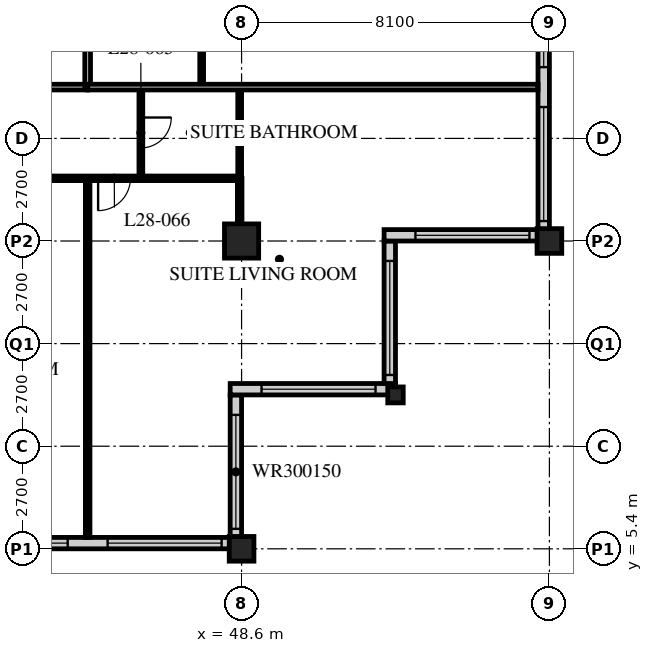
"""IFC4 building model, lengths in metres.
Left out: names, types, materials, properties, quantities, classifications, styles, units other than length and angle.
Written with IfcOpenShell. Run it as: python <this file> out.ifc"""

import sys

from ifc_helpers import new_model, si_unit, direction, frame, frame_2d, origin, origin_2d, place, context, subcontext, project, spatial, rectangle, hollow_rectangle, i_section, extrude, element, fill, save


model = new_model("IFC4")
c1 = context("Model", 3, precision=1e-05, world=origin(), true_north=direction((0.0, 1.0)))
c2 = subcontext(c1, "Body", "Model", "MODEL_VIEW")
j1 = project(units=[si_unit("LENGTHUNIT", "METRE"), si_unit("PLANEANGLEUNIT", "RADIAN")], contexts=[c1])
p1 = place(None, origin())
s1 = spatial("IfcSite", under=j1, at=p1, CompositionType="ELEMENT")
p2 = place(p1, origin())
s2 = spatial("IfcBuilding", under=s1, at=p2, CompositionType="ELEMENT")
p3 = place(p2, frame((0.0, 0.0, 113.6)))
s3 = spatial("IfcBuildingStorey", under=s2, at=p3, CompositionType="ELEMENT", Elevation=113.6)
p4 = place(p3, frame((48.6, 5.4, 0.0), z_axis=(0.0, 0.0, 1.0), x_axis=(1.0, 0.0, 0.0)))
e1 = element("IfcColumn", 1, at=p4, inside=s3, PredefinedType="COLUMN", context=c2, shape_type="SweptSolid", body=[
    extrude(hollow_rectangle(XDim=0.65, YDim=0.65, WallThickness=0.055, at=origin_2d()), origin(), (0.0, 0.0, 1.0), 3.4),
])
p5 = place(p3, frame((48.6, 13.5, 0.0), z_axis=(0.0, 0.0, 1.0), x_axis=(1.0, 0.0, 0.0)))
e2 = element("IfcColumn", 2, at=p5, inside=s3, PredefinedType="COLUMN", context=c2, shape_type="SweptSolid", body=[
    extrude(hollow_rectangle(XDim=0.9, YDim=0.9, WallThickness=0.09, at=origin_2d()), origin(), (0.0, 0.0, 1.0), 3.4),
])
p6 = place(p3, frame((52.65, 9.45, 0.0), z_axis=(0.0, 0.0, 1.0), x_axis=(1.0, 0.0, 0.0)))
e3 = element("IfcColumn", 3, at=p6, inside=s3, PredefinedType="COLUMN", context=c2, shape_type="SweptSolid", body=[
    extrude(i_section(OverallWidth=0.407, OverallDepth=0.419, WebThickness=0.031, FlangeThickness=0.049, FilletRadius=0.015, at=origin_2d()), origin(), (0.0, 0.0, 1.0), 3.4),
])
p7 = place(p3, frame((56.7, 13.5, 0.0), z_axis=(0.0, 0.0, 1.0), x_axis=(1.0, 0.0, 0.0)))
e4 = element("IfcColumn", 4, at=p7, inside=s3, PredefinedType="COLUMN", context=c2, shape_type="SweptSolid", body=[
    extrude(hollow_rectangle(XDim=0.65, YDim=0.65, WallThickness=0.055, at=origin_2d()), origin(), (0.0, 0.0, 1.0), 3.4),
])
p8 = place(p3, frame((8.4, 5.55, 0.0), z_axis=(0.0, 0.0, 1.0), x_axis=(1.0, 0.0, 0.0)))
e5 = element("IfcWall", 5, at=p8, inside=s3, PredefinedType="SOLIDWALL", context=c2, shape_type="SweptSolid", body=[
    extrude(rectangle(XDim=40.2, YDim=0.3, at=frame_2d((20.1, 0.0))), origin(), (0.0, 0.0, 1.0), 3.19),
])
p9 = place(p8, frame((0.225, 0.0, 0.9)))
e6 = element("IfcOpeningElement", 6, at=p9, cuts=e5, PredefinedType="OPENING", context=c2, shape_type="SweptSolid", body=[
    extrude(rectangle(XDim=3.0, YDim=2.0, at=frame_2d((1.5, 1.0))), frame((0.0, 0.16, 0.0), z_axis=(0.0, -1.0, 0.0), x_axis=(1.0, 0.0, 0.0)), (0.0, 0.0, 1.0), 0.32),
])
p10 = place(p8, frame((4.275, 0.0, 0.9)))
e7 = element("IfcOpeningElement", 7, at=p10, cuts=e5, PredefinedType="OPENING", context=c2, shape_type="SweptSolid", body=[
    extrude(rectangle(XDim=3.0, YDim=2.0, at=frame_2d((1.5, 1.0))), frame((0.0, 0.16, 0.0), z_axis=(0.0, -1.0, 0.0), x_axis=(1.0, 0.0, 0.0)), (0.0, 0.0, 1.0), 0.32),
])
p11 = place(p8, frame((8.325, 0.0, 0.9)))
e8 = element("IfcOpeningElement", 8, at=p11, cuts=e5, PredefinedType="OPENING", context=c2, shape_type="SweptSolid", body=[
    extrude(rectangle(XDim=3.0, YDim=2.0, at=frame_2d((1.5, 1.0))), frame((0.0, 0.16, 0.0), z_axis=(0.0, -1.0, 0.0), x_axis=(1.0, 0.0, 0.0)), (0.0, 0.0, 1.0), 0.32),
])
p12 = place(p8, frame((12.375, 0.0, 0.9)))
e9 = element("IfcOpeningElement", 9, at=p12, cuts=e5, PredefinedType="OPENING", context=c2, shape_type="SweptSolid", body=[
    extrude(rectangle(XDim=3.0, YDim=2.0, at=frame_2d((1.5, 1.0))), frame((0.0, 0.16, 0.0), z_axis=(0.0, -1.0, 0.0), x_axis=(1.0, 0.0, 0.0)), (0.0, 0.0, 1.0), 0.32),
])
p13 = place(p8, frame((16.425, 0.0, 0.9)))
e10 = element("IfcOpeningElement", 10, at=p13, cuts=e5, PredefinedType="OPENING", context=c2, shape_type="SweptSolid", body=[
    extrude(rectangle(XDim=3.0, YDim=2.0, at=frame_2d((1.5, 1.0))), frame((0.0, 0.16, 0.0), z_axis=(0.0, -1.0, 0.0), x_axis=(1.0, 0.0, 0.0)), (0.0, 0.0, 1.0), 0.32),
])
p14 = place(p8, frame((20.475, 0.0, 0.9)))
e11 = element("IfcOpeningElement", 11, at=p14, cuts=e5, PredefinedType="OPENING", context=c2, shape_type="SweptSolid", body=[
    extrude(rectangle(XDim=3.0, YDim=2.0, at=frame_2d((1.5, 1.0))), frame((0.0, 0.16, 0.0), z_axis=(0.0, -1.0, 0.0), x_axis=(1.0, 0.0, 0.0)), (0.0, 0.0, 1.0), 0.32),
])
p15 = place(p8, frame((24.525, 0.0, 0.9)))
e12 = element("IfcOpeningElement", 12, at=p15, cuts=e5, PredefinedType="OPENING", context=c2, shape_type="SweptSolid", body=[
    extrude(rectangle(XDim=3.0, YDim=2.0, at=frame_2d((1.5, 1.0))), frame((0.0, 0.16, 0.0), z_axis=(0.0, -1.0, 0.0), x_axis=(1.0, 0.0, 0.0)), (0.0, 0.0, 1.0), 0.32),
])
p16 = place(p8, frame((28.575, 0.0, 0.9)))
e13 = element("IfcOpeningElement", 13, at=p16, cuts=e5, PredefinedType="OPENING", context=c2, shape_type="SweptSolid", body=[
    extrude(rectangle(XDim=3.0, YDim=2.0, at=frame_2d((1.5, 1.0))), frame((0.0, 0.16, 0.0), z_axis=(0.0, -1.0, 0.0), x_axis=(1.0, 0.0, 0.0)), (0.0, 0.0, 1.0), 0.32),
])
p17 = place(p8, frame((32.625, 0.0, 0.9)))
e14 = element("IfcOpeningElement", 14, at=p17, cuts=e5, PredefinedType="OPENING", context=c2, shape_type="SweptSolid", body=[
    extrude(rectangle(XDim=3.0, YDim=2.0, at=frame_2d((1.5, 1.0))), frame((0.0, 0.16, 0.0), z_axis=(0.0, -1.0, 0.0), x_axis=(1.0, 0.0, 0.0)), (0.0, 0.0, 1.0), 0.32),
])
p18 = place(p8, frame((36.675, 0.0, 0.9)))
e15 = element("IfcOpeningElement", 15, at=p18, cuts=e5, PredefinedType="OPENING", context=c2, shape_type="SweptSolid", body=[
    extrude(rectangle(XDim=3.0, YDim=2.0, at=frame_2d((1.5, 1.0))), frame((0.0, 0.16, 0.0), z_axis=(0.0, -1.0, 0.0), x_axis=(1.0, 0.0, 0.0)), (0.0, 0.0, 1.0), 0.32),
])
p19 = place(p3, frame((48.45, 5.7, 0.0), z_axis=(0.0, 0.0, 1.0), x_axis=(0.0, 1.0, 0.0)))
e16 = element("IfcWall", 16, at=p19, inside=s3, PredefinedType="SOLIDWALL", context=c2, shape_type="SweptSolid", body=[
    extrude(rectangle(XDim=3.75, YDim=0.3, at=frame_2d((1.875, 0.0))), origin(), (0.0, 0.0, 1.0), 3.19),
])
p20 = place(p19, frame((0.225, 0.0, 0.9)))
e17 = element("IfcOpeningElement", 17, at=p20, cuts=e16, PredefinedType="OPENING", context=c2, shape_type="SweptSolid", body=[
    extrude(rectangle(XDim=3.0, YDim=1.5, at=frame_2d((1.5, 0.75))), frame((0.0, 0.16, 0.0), z_axis=(0.0, -1.0, 0.0), x_axis=(1.0, 0.0, 0.0)), (0.0, 0.0, 1.0), 0.32),
])
p21 = place(p3, frame((48.3, 9.6, 0.0), z_axis=(0.0, 0.0, 1.0), x_axis=(1.0, 0.0, 0.0)))
e18 = element("IfcWall", 18, at=p21, inside=s3, PredefinedType="SOLIDWALL", context=c2, shape_type="SweptSolid", body=[
    extrude(rectangle(XDim=4.35, YDim=0.3, at=frame_2d((2.175, 0.0))), origin(), (0.0, 0.0, 1.0), 3.19),
])
p22 = place(p21, frame((0.825, 0.0, 0.9)))
e19 = element("IfcOpeningElement", 19, at=p22, cuts=e18, PredefinedType="OPENING", context=c2, shape_type="SweptSolid", body=[
    extrude(rectangle(XDim=3.0, YDim=1.5, at=frame_2d((1.5, 0.75))), frame((0.0, 0.16, 0.0), z_axis=(0.0, -1.0, 0.0), x_axis=(1.0, 0.0, 0.0)), (0.0, 0.0, 1.0), 0.32),
])
p23 = place(p3, frame((52.5, 9.75, 0.0), z_axis=(0.0, 0.0, 1.0), x_axis=(0.0, 1.0, 0.0)))
e20 = element("IfcWall", 20, at=p23, inside=s3, PredefinedType="SOLIDWALL", context=c2, shape_type="SweptSolid", body=[
    extrude(rectangle(XDim=3.75, YDim=0.3, at=frame_2d((1.875, 0.0))), origin(), (0.0, 0.0, 1.0), 3.19),
])
p24 = place(p23, frame((0.225, 0.0, 0.9)))
e21 = element("IfcOpeningElement", 21, at=p24, cuts=e20, PredefinedType="OPENING", context=c2, shape_type="SweptSolid", body=[
    extrude(rectangle(XDim=3.0, YDim=1.5, at=frame_2d((1.5, 0.75))), frame((0.0, 0.16, 0.0), z_axis=(0.0, -1.0, 0.0), x_axis=(1.0, 0.0, 0.0)), (0.0, 0.0, 1.0), 0.32),
])
p25 = place(p3, frame((52.35, 13.65, 0.0), z_axis=(0.0, 0.0, 1.0), x_axis=(1.0, 0.0, 0.0)))
e22 = element("IfcWall", 22, at=p25, inside=s3, PredefinedType="SOLIDWALL", context=c2, shape_type="SweptSolid", body=[
    extrude(rectangle(XDim=4.35, YDim=0.3, at=frame_2d((2.175, 0.0))), origin(), (0.0, 0.0, 1.0), 3.19),
])
p26 = place(p25, frame((0.825, 0.0, 0.9)))
e23 = element("IfcOpeningElement", 23, at=p26, cuts=e22, PredefinedType="OPENING", context=c2, shape_type="SweptSolid", body=[
    extrude(rectangle(XDim=3.0, YDim=1.5, at=frame_2d((1.5, 0.75))), frame((0.0, 0.16, 0.0), z_axis=(0.0, -1.0, 0.0), x_axis=(1.0, 0.0, 0.0)), (0.0, 0.0, 1.0), 0.32),
])
p27 = place(p3, frame((56.55, 13.8, 0.0), z_axis=(0.0, 0.0, 1.0), x_axis=(0.0, 1.0, 0.0)))
e24 = element("IfcWall", 24, at=p27, inside=s3, PredefinedType="SOLIDWALL", context=c2, shape_type="SweptSolid", body=[
    extrude(rectangle(XDim=32.1, YDim=0.3, at=frame_2d((16.05, 0.0))), origin(), (0.0, 0.0, 1.0), 3.19),
])
p28 = place(p27, frame((0.225, 0.0, 0.9)))
e25 = element("IfcOpeningElement", 25, at=p28, cuts=e24, PredefinedType="OPENING", context=c2, shape_type="SweptSolid", body=[
    extrude(rectangle(XDim=3.0, YDim=2.0, at=frame_2d((1.5, 1.0))), frame((0.0, 0.16, 0.0), z_axis=(0.0, -1.0, 0.0), x_axis=(1.0, 0.0, 0.0)), (0.0, 0.0, 1.0), 0.32),
])
p29 = place(p27, frame((4.275, 0.0, 0.9)))
e26 = element("IfcOpeningElement", 26, at=p29, cuts=e24, PredefinedType="OPENING", context=c2, shape_type="SweptSolid", body=[
    extrude(rectangle(XDim=3.0, YDim=2.0, at=frame_2d((1.5, 1.0))), frame((0.0, 0.16, 0.0), z_axis=(0.0, -1.0, 0.0), x_axis=(1.0, 0.0, 0.0)), (0.0, 0.0, 1.0), 0.32),
])
p30 = place(p27, frame((8.325, 0.0, 0.9)))
e27 = element("IfcOpeningElement", 27, at=p30, cuts=e24, PredefinedType="OPENING", context=c2, shape_type="SweptSolid", body=[
    extrude(rectangle(XDim=3.0, YDim=2.0, at=frame_2d((1.5, 1.0))), frame((0.0, 0.16, 0.0), z_axis=(0.0, -1.0, 0.0), x_axis=(1.0, 0.0, 0.0)), (0.0, 0.0, 1.0), 0.32),
])
p31 = place(p27, frame((12.375, 0.0, 0.9)))
e28 = element("IfcOpeningElement", 28, at=p31, cuts=e24, PredefinedType="OPENING", context=c2, shape_type="SweptSolid", body=[
    extrude(rectangle(XDim=3.0, YDim=2.0, at=frame_2d((1.5, 1.0))), frame((0.0, 0.16, 0.0), z_axis=(0.0, -1.0, 0.0), x_axis=(1.0, 0.0, 0.0)), (0.0, 0.0, 1.0), 0.32),
])
p32 = place(p27, frame((16.425, 0.0, 0.9)))
e29 = element("IfcOpeningElement", 29, at=p32, cuts=e24, PredefinedType="OPENING", context=c2, shape_type="SweptSolid", body=[
    extrude(rectangle(XDim=3.0, YDim=2.0, at=frame_2d((1.5, 1.0))), frame((0.0, 0.16, 0.0), z_axis=(0.0, -1.0, 0.0), x_axis=(1.0, 0.0, 0.0)), (0.0, 0.0, 1.0), 0.32),
])
p33 = place(p27, frame((20.475, 0.0, 0.9)))
e30 = element("IfcOpeningElement", 30, at=p33, cuts=e24, PredefinedType="OPENING", context=c2, shape_type="SweptSolid", body=[
    extrude(rectangle(XDim=3.0, YDim=2.0, at=frame_2d((1.5, 1.0))), frame((0.0, 0.16, 0.0), z_axis=(0.0, -1.0, 0.0), x_axis=(1.0, 0.0, 0.0)), (0.0, 0.0, 1.0), 0.32),
])
p34 = place(p27, frame((24.525, 0.0, 0.9)))
e31 = element("IfcOpeningElement", 31, at=p34, cuts=e24, PredefinedType="OPENING", context=c2, shape_type="SweptSolid", body=[
    extrude(rectangle(XDim=3.0, YDim=2.0, at=frame_2d((1.5, 1.0))), frame((0.0, 0.16, 0.0), z_axis=(0.0, -1.0, 0.0), x_axis=(1.0, 0.0, 0.0)), (0.0, 0.0, 1.0), 0.32),
])
p35 = place(p27, frame((28.575, 0.0, 0.9)))
e32 = element("IfcOpeningElement", 32, at=p35, cuts=e24, PredefinedType="OPENING", context=c2, shape_type="SweptSolid", body=[
    extrude(rectangle(XDim=3.0, YDim=2.0, at=frame_2d((1.5, 1.0))), frame((0.0, 0.16, 0.0), z_axis=(0.0, -1.0, 0.0), x_axis=(1.0, 0.0, 0.0)), (0.0, 0.0, 1.0), 0.32),
])
p36 = place(p3, frame((12.15, 17.55, 0.0), z_axis=(0.0, 0.0, 1.0), x_axis=(1.0, 0.0, 0.0)))
e33 = element("IfcWall", 33, at=p36, inside=s3, PredefinedType="PARTITIONING", context=c2, shape_type="SweptSolid", body=[
    extrude(rectangle(XDim=32.4, YDim=0.15, at=frame_2d((16.2, 0.0))), origin(), (0.0, 0.0, 1.0), 3.19),
])
p37 = place(p36, frame((5.95, 0.0, 0.0)))
e34 = element("IfcOpeningElement", 34, at=p37, cuts=e33, PredefinedType="OPENING", context=c2, shape_type="SweptSolid", body=[
    extrude(rectangle(XDim=1.0, YDim=2.1, at=frame_2d((0.5, 1.05))), frame((0.0, 0.085, 0.0), z_axis=(0.0, -1.0, 0.0), x_axis=(1.0, 0.0, 0.0)), (0.0, 0.0, 1.0), 0.17),
])
p38 = place(p36, frame((17.725, 0.0, 0.0)))
e35 = element("IfcOpeningElement", 35, at=p38, cuts=e33, PredefinedType="OPENING", context=c2, shape_type="SweptSolid", body=[
    extrude(rectangle(XDim=1.0, YDim=2.1, at=frame_2d((0.5, 1.05))), frame((0.0, 0.085, 0.0), z_axis=(0.0, -1.0, 0.0), x_axis=(1.0, 0.0, 0.0)), (0.0, 0.0, 1.0), 0.17),
])
p39 = place(p36, frame((26.75, 0.0, 0.0)))
e36 = element("IfcOpeningElement", 36, at=p39, cuts=e33, PredefinedType="OPENING", context=c2, shape_type="SweptSolid", body=[
    extrude(rectangle(XDim=1.0, YDim=2.1, at=frame_2d((0.5, 1.05))), frame((0.0, 0.085, 0.0), z_axis=(0.0, -1.0, 0.0), x_axis=(1.0, 0.0, 0.0)), (0.0, 0.0, 1.0), 0.17),
])
p40 = place(p36, frame((1.525, 0.0, 0.0)))
e37 = element("IfcOpeningElement", 37, at=p40, cuts=e33, PredefinedType="OPENING", context=c2, shape_type="SweptSolid", body=[
    extrude(rectangle(XDim=1.0, YDim=2.1, at=frame_2d((0.5, 1.05))), frame((0.0, 0.085, 0.0), z_axis=(0.0, -1.0, 0.0), x_axis=(1.0, 0.0, 0.0)), (0.0, 0.0, 1.0), 0.17),
])
p41 = place(p36, frame((29.875, 0.0, 0.0)))
e38 = element("IfcOpeningElement", 38, at=p41, cuts=e33, PredefinedType="OPENING", context=c2, shape_type="SweptSolid", body=[
    extrude(rectangle(XDim=1.0, YDim=2.1, at=frame_2d((0.5, 1.05))), frame((0.0, 0.085, 0.0), z_axis=(0.0, -1.0, 0.0), x_axis=(1.0, 0.0, 0.0)), (0.0, 0.0, 1.0), 0.17),
])
p42 = place(p3, frame((44.55, 17.55, 0.0), z_axis=(0.0, 0.0, 1.0), x_axis=(0.0, 1.0, 0.0)))
e39 = element("IfcWall", 39, at=p42, inside=s3, PredefinedType="PARTITIONING", context=c2, shape_type="SweptSolid", body=[
    extrude(rectangle(XDim=28.35, YDim=0.15, at=frame_2d((14.175, 0.0))), origin(), (0.0, 0.0, 1.0), 3.19),
])
p43 = place(p42, frame((2.75, 0.0, 0.0)))
e40 = element("IfcOpeningElement", 40, at=p43, cuts=e39, PredefinedType="OPENING", context=c2, shape_type="SweptSolid", body=[
    extrude(rectangle(XDim=1.0, YDim=2.1, at=frame_2d((0.5, 1.05))), frame((0.0, 0.085, 0.0), z_axis=(0.0, -1.0, 0.0), x_axis=(1.0, 0.0, 0.0)), (0.0, 0.0, 1.0), 0.17),
])
p44 = place(p42, frame((6.5, 0.0, 0.0)))
e41 = element("IfcOpeningElement", 41, at=p44, cuts=e39, PredefinedType="OPENING", context=c2, shape_type="SweptSolid", body=[
    extrude(rectangle(XDim=1.0, YDim=2.1, at=frame_2d((0.5, 1.05))), frame((0.0, 0.085, 0.0), z_axis=(0.0, -1.0, 0.0), x_axis=(1.0, 0.0, 0.0)), (0.0, 0.0, 1.0), 0.17),
])
p45 = place(p42, frame((10.0, 0.0, 0.0)))
e42 = element("IfcOpeningElement", 42, at=p45, cuts=e39, PredefinedType="OPENING", context=c2, shape_type="SweptSolid", body=[
    extrude(rectangle(XDim=1.0, YDim=2.1, at=frame_2d((0.5, 1.05))), frame((0.0, 0.085, 0.0), z_axis=(0.0, -1.0, 0.0), x_axis=(1.0, 0.0, 0.0)), (0.0, 0.0, 1.0), 0.17),
])
p46 = place(p42, frame((21.65, 0.0, 0.0)))
e43 = element("IfcOpeningElement", 43, at=p46, cuts=e39, PredefinedType="OPENING", context=c2, shape_type="SweptSolid", body=[
    extrude(rectangle(XDim=1.0, YDim=2.1, at=frame_2d((0.5, 1.05))), frame((0.0, 0.085, 0.0), z_axis=(0.0, -1.0, 0.0), x_axis=(1.0, 0.0, 0.0)), (0.0, 0.0, 1.0), 0.17),
])
p47 = place(p42, frame((26.75, 0.0, 0.0)))
e44 = element("IfcOpeningElement", 44, at=p47, cuts=e39, PredefinedType="OPENING", context=c2, shape_type="SweptSolid", body=[
    extrude(rectangle(XDim=1.0, YDim=2.1, at=frame_2d((0.5, 1.05))), frame((0.0, 0.085, 0.0), z_axis=(0.0, -1.0, 0.0), x_axis=(1.0, 0.0, 0.0)), (0.0, 0.0, 1.0), 0.17),
])
p48 = place(p3, frame((47.55, 17.55, 0.0), z_axis=(0.0, 0.0, 1.0), x_axis=(0.0, 1.0, 0.0)))
e45 = element("IfcWall", 45, at=p48, inside=s3, PredefinedType="PARTITIONING", context=c2, shape_type="SweptSolid", body=[
    extrude(rectangle(XDim=2.6, YDim=0.1, at=frame_2d((1.3, 0.0))), origin(), (0.0, 0.0, 1.0), 3.19),
])
p49 = place(p3, frame((40.5, 15.15, 0.0), z_axis=(0.0, 0.0, 1.0), x_axis=(1.0, 0.0, 0.0)))
e46 = element("IfcWall", 46, at=p49, inside=s3, PredefinedType="PARTITIONING", context=c2, shape_type="SweptSolid", body=[
    extrude(rectangle(XDim=8.05, YDim=0.12, at=frame_2d((4.025, 0.0))), origin(), (0.0, 0.0, 1.0), 3.19),
])
p50 = place(p49, frame((0.475, 0.0, 0.0)))
e47 = element("IfcOpeningElement", 47, at=p50, cuts=e46, PredefinedType="OPENING", context=c2, shape_type="SweptSolid", body=[
    extrude(rectangle(XDim=0.85, YDim=2.1, at=frame_2d((0.425, 1.05))), frame((0.0, 0.07, 0.0), z_axis=(0.0, -1.0, 0.0), x_axis=(1.0, 0.0, 0.0)), (0.0, 0.0, 1.0), 0.14),
])
p51 = place(p49, frame((4.325, 0.0, 0.0)))
e48 = element("IfcOpeningElement", 48, at=p51, cuts=e46, PredefinedType="OPENING", context=c2, shape_type="SweptSolid", body=[
    extrude(rectangle(XDim=0.85, YDim=2.1, at=frame_2d((0.425, 1.05))), frame((0.0, 0.07, 0.0), z_axis=(0.0, -1.0, 0.0), x_axis=(1.0, 0.0, 0.0)), (0.0, 0.0, 1.0), 0.14),
])
p52 = place(p3, frame((45.95, 17.55, 0.0), z_axis=(0.0, 0.0, 1.0), x_axis=(0.0, -1.0, 0.0)))
e49 = element("IfcWall", 49, at=p52, inside=s3, PredefinedType="PARTITIONING", context=c2, shape_type="SweptSolid", body=[
    extrude(rectangle(XDim=2.4, YDim=0.1, at=frame_2d((1.2, 0.0))), origin(), (0.0, 0.0, 1.0), 3.19),
])
p53 = place(p52, frame((0.8, 0.0, 0.0)))
e50 = element("IfcOpeningElement", 50, at=p53, cuts=e49, PredefinedType="OPENING", context=c2, shape_type="SweptSolid", body=[
    extrude(rectangle(XDim=0.8, YDim=2.1, at=frame_2d((0.4, 1.05))), frame((0.0, 0.06, 0.0), z_axis=(0.0, -1.0, 0.0), x_axis=(1.0, 0.0, 0.0)), (0.0, 0.0, 1.0), 0.12),
])
p54 = place(p3, frame((48.55, 17.55, 0.0), z_axis=(0.0, 0.0, 1.0), x_axis=(0.0, -1.0, 0.0)))
e51 = element("IfcWall", 51, at=p54, inside=s3, PredefinedType="PARTITIONING", context=c2, shape_type="SweptSolid", body=[
    extrude(rectangle(XDim=2.4, YDim=0.1, at=frame_2d((1.2, 0.0))), origin(), (0.0, 0.0, 1.0), 2.578),
])
p55 = place(p3, frame((44.55, 15.15, 0.0), z_axis=(0.0, 0.0, 1.0), x_axis=(0.0, -1.0, 0.0)))
e52 = element("IfcWall", 52, at=p55, inside=s3, PredefinedType="PARTITIONING", context=c2, shape_type="SweptSolid", body=[
    extrude(rectangle(XDim=9.45, YDim=0.12, at=frame_2d((4.725, 0.0))), origin(), (0.0, 0.0, 1.0), 3.19),
])
p56 = place(p3, frame((44.55, 17.55, 0.0), z_axis=(0.0, 0.0, 1.0), x_axis=(1.0, 0.0, 0.0)))
e53 = element("IfcWall", 53, at=p56, inside=s3, PredefinedType="PARTITIONING", context=c2, shape_type="SweptSolid", body=[
    extrude(rectangle(XDim=11.85, YDim=0.15, at=frame_2d((5.925, 0.0))), origin(), (0.0, 0.0, 1.0), 3.19),
])
p57 = place(p3, frame((48.55, 15.15, 0.0), z_axis=(0.0, 0.0, 1.0), x_axis=(0.0, -1.0, 0.0)))
e54 = element("IfcWall", 54, at=p57, inside=s3, PredefinedType="PARTITIONING", context=c2, shape_type="SweptSolid", body=[
    extrude(rectangle(XDim=1.2, YDim=0.12, at=frame_2d((0.6, 0.0))), origin(), (0.0, 0.0, 1.0), 2.578),
])
p58 = place(p17, origin())
e55 = element("IfcWindow", 55, at=p58, inside=s3, PartitioningType="SINGLE_PANEL", PredefinedType="WINDOW", context=c2, shape_type="SweptSolid", body=[
    extrude(rectangle(XDim=3.0, YDim=2.0, at=frame_2d((1.5, 1.0))), frame((0.0, 0.03, 0.0), z_axis=(0.0, -1.0, 0.0), x_axis=(1.0, 0.0, 0.0)), (0.0, 0.0, 1.0), 0.06),
])
fill(e14, e55)
p59 = place(p18, origin())
e56 = element("IfcWindow", 56, at=p59, inside=s3, PartitioningType="SINGLE_PANEL", PredefinedType="WINDOW", context=c2, shape_type="SweptSolid", body=[
    extrude(rectangle(XDim=3.0, YDim=2.0, at=frame_2d((1.5, 1.0))), frame((0.0, 0.03, 0.0), z_axis=(0.0, -1.0, 0.0), x_axis=(1.0, 0.0, 0.0)), (0.0, 0.0, 1.0), 0.06),
])
fill(e15, e56)
p60 = place(p20, origin())
e57 = element("IfcWindow", 57, at=p60, inside=s3, PartitioningType="SINGLE_PANEL", PredefinedType="WINDOW", context=c2, shape_type="SweptSolid", body=[
    extrude(rectangle(XDim=3.0, YDim=1.5, at=frame_2d((1.5, 0.75))), frame((0.0, 0.03, 0.0), z_axis=(0.0, -1.0, 0.0), x_axis=(1.0, 0.0, 0.0)), (0.0, 0.0, 1.0), 0.06),
])
fill(e17, e57)
p61 = place(p22, origin())
e58 = element("IfcWindow", 58, at=p61, inside=s3, PartitioningType="SINGLE_PANEL", PredefinedType="WINDOW", context=c2, shape_type="SweptSolid", body=[
    extrude(rectangle(XDim=3.0, YDim=1.5, at=frame_2d((1.5, 0.75))), frame((0.0, 0.03, 0.0), z_axis=(0.0, -1.0, 0.0), x_axis=(1.0, 0.0, 0.0)), (0.0, 0.0, 1.0), 0.06),
])
fill(e19, e58)
p62 = place(p24, origin())
e59 = element("IfcWindow", 59, at=p62, inside=s3, PartitioningType="SINGLE_PANEL", PredefinedType="WINDOW", context=c2, shape_type="SweptSolid", body=[
    extrude(rectangle(XDim=3.0, YDim=1.5, at=frame_2d((1.5, 0.75))), frame((0.0, 0.03, 0.0), z_axis=(0.0, -1.0, 0.0), x_axis=(1.0, 0.0, 0.0)), (0.0, 0.0, 1.0), 0.06),
])
fill(e21, e59)
p63 = place(p26, origin())
e60 = element("IfcWindow", 60, at=p63, inside=s3, PartitioningType="SINGLE_PANEL", PredefinedType="WINDOW", context=c2, shape_type="SweptSolid", body=[
    extrude(rectangle(XDim=3.0, YDim=1.5, at=frame_2d((1.5, 0.75))), frame((0.0, 0.03, 0.0), z_axis=(0.0, -1.0, 0.0), x_axis=(1.0, 0.0, 0.0)), (0.0, 0.0, 1.0), 0.06),
])
fill(e23, e60)
p64 = place(p28, origin())
e61 = element("IfcWindow", 61, at=p64, inside=s3, PartitioningType="SINGLE_PANEL", PredefinedType="WINDOW", context=c2, shape_type="SweptSolid", body=[
    extrude(rectangle(XDim=3.0, YDim=2.0, at=frame_2d((1.5, 1.0))), frame((0.0, 0.03, 0.0), z_axis=(0.0, -1.0, 0.0), x_axis=(1.0, 0.0, 0.0)), (0.0, 0.0, 1.0), 0.06),
])
fill(e25, e61)
p65 = place(p29, origin())
e62 = element("IfcWindow", 62, at=p65, inside=s3, PartitioningType="SINGLE_PANEL", PredefinedType="WINDOW", context=c2, shape_type="SweptSolid", body=[
    extrude(rectangle(XDim=3.0, YDim=2.0, at=frame_2d((1.5, 1.0))), frame((0.0, 0.03, 0.0), z_axis=(0.0, -1.0, 0.0), x_axis=(1.0, 0.0, 0.0)), (0.0, 0.0, 1.0), 0.06),
])
fill(e26, e62)
p66 = place(p53, origin())
e63 = element("IfcDoor", 63, at=p66, inside=s3, OperationType="SINGLE_SWING_LEFT", PredefinedType="DOOR", context=c2, shape_type="SweptSolid", body=[
    extrude(rectangle(XDim=0.8, YDim=2.1, at=frame_2d((0.4, 1.05))), frame((0.0, 0.025, 0.0), z_axis=(0.0, -1.0, 0.0), x_axis=(1.0, 0.0, 0.0)), (0.0, 0.0, 1.0), 0.05),
])
fill(e50, e63)
p67 = place(p51, origin())
e64 = element("IfcDoor", 64, at=p67, inside=s3, OperationType="SINGLE_SWING_RIGHT", PredefinedType="DOOR", context=c2, shape_type="SweptSolid", body=[
    extrude(rectangle(XDim=0.85, YDim=2.1, at=frame_2d((0.425, 1.05))), frame((0.0, 0.025, 0.0), z_axis=(0.0, -1.0, 0.0), x_axis=(1.0, 0.0, 0.0)), (0.0, 0.0, 1.0), 0.05),
])
fill(e48, e64)
save(model, sys.argv[1])
